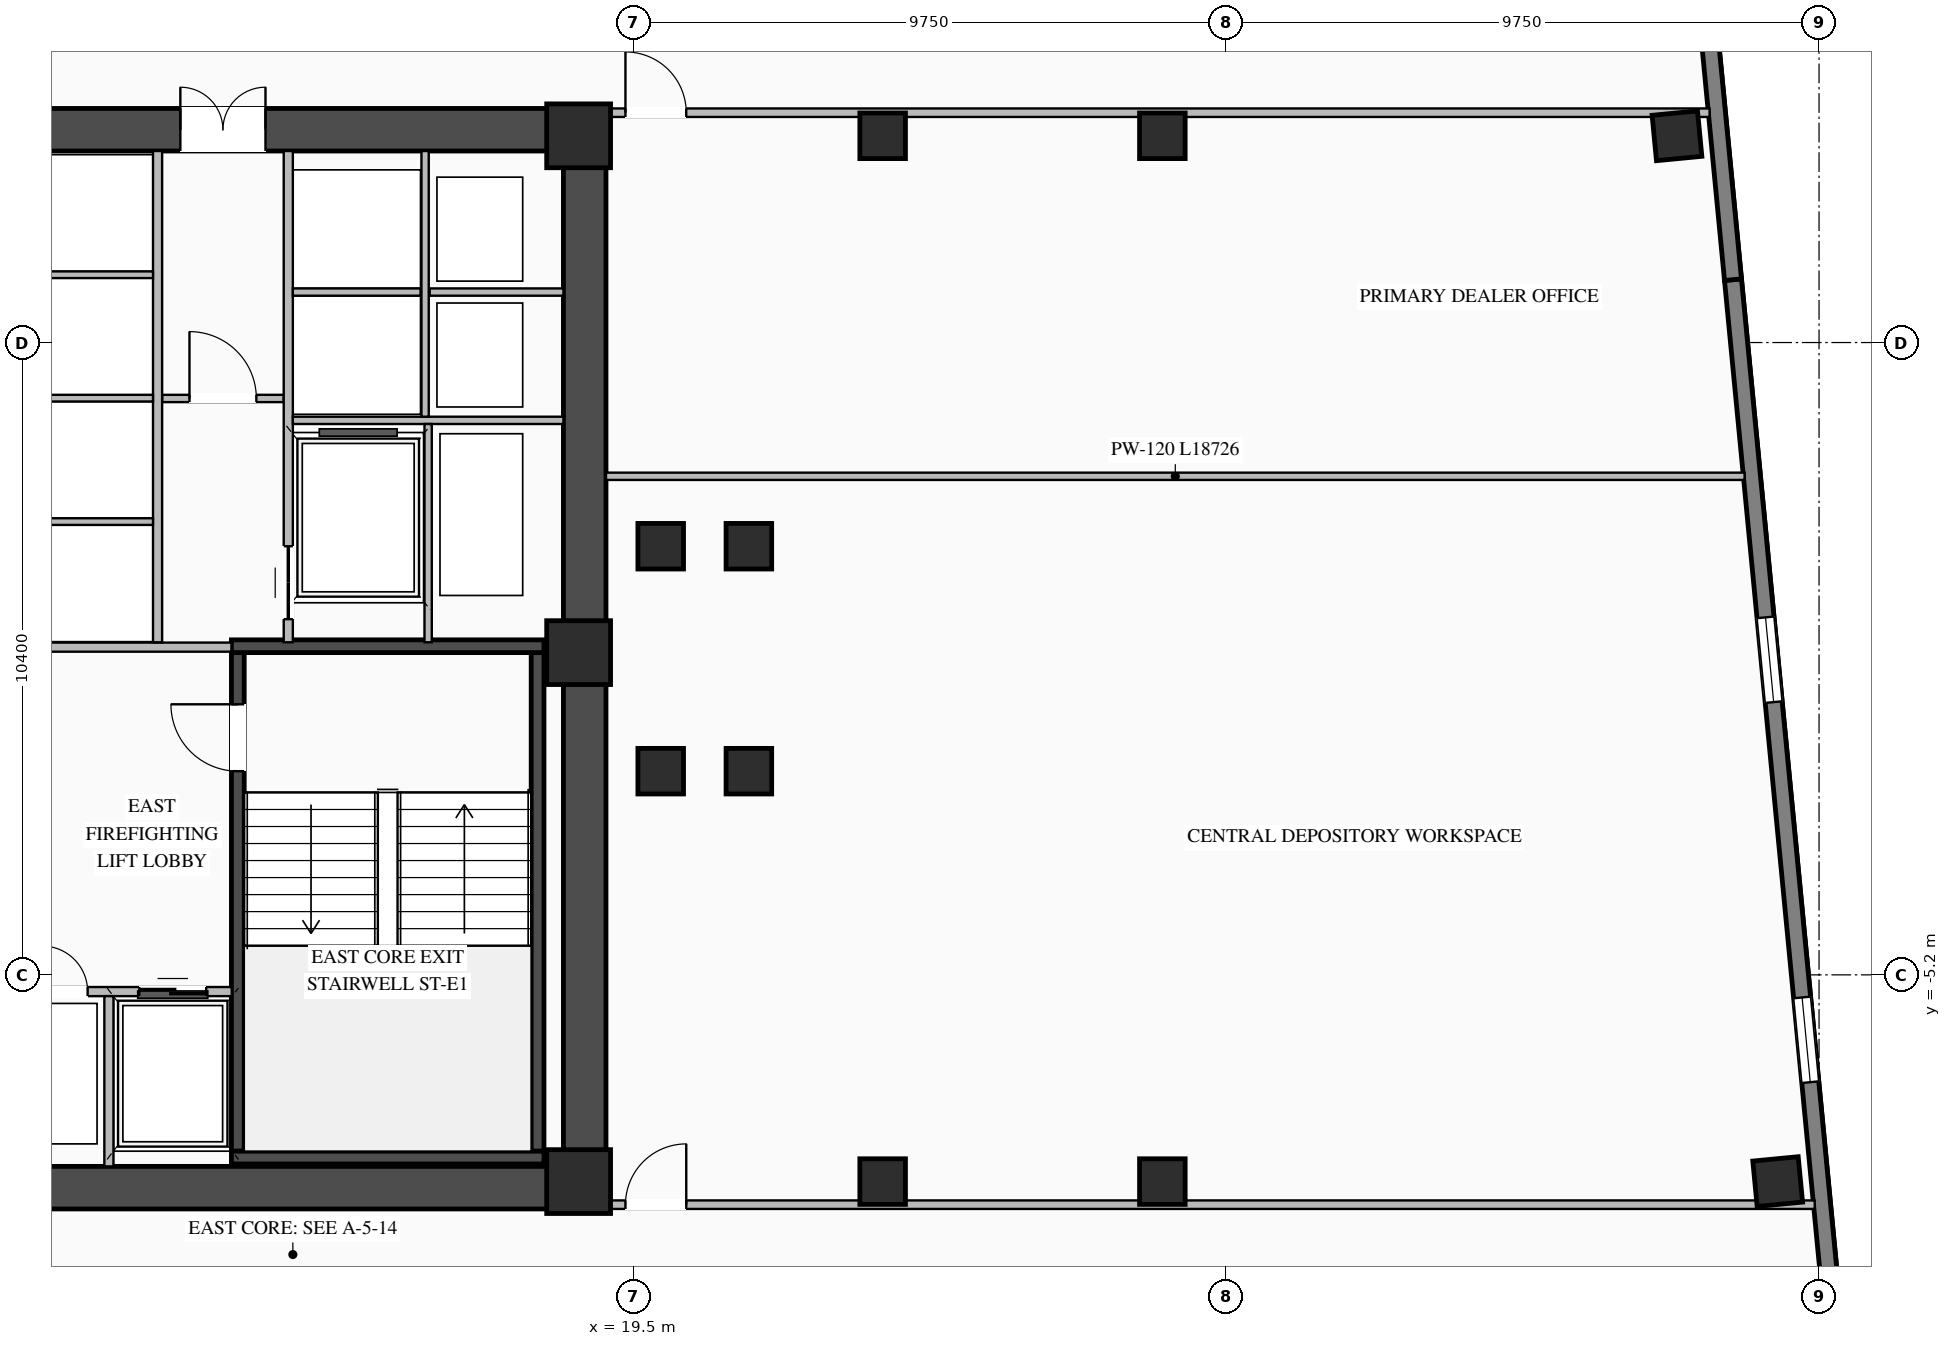
"""IFC4 building model, lengths in metres.
Left out: names, types, materials, properties, quantities, classifications, styles, units other than length and angle.
Written with IfcOpenShell. Run it as: python <this file> out.ifc"""

import sys

from ifc_helpers import new_model, si_unit, direction, frame, frame_2d, origin, origin_2d, place, context, subcontext, project, spatial, rectangle, i_section, extrude, element, fill, save


model = new_model("IFC4")
c1 = context("Model", 3, precision=1e-05, world=origin(), true_north=direction((0.0, 1.0)))
c2 = subcontext(c1, "Body", "Model", "MODEL_VIEW")
j1 = project(units=[si_unit("LENGTHUNIT", "METRE"), si_unit("PLANEANGLEUNIT", "RADIAN")], contexts=[c1])
p1 = place(None, origin())
s1 = spatial("IfcSite", under=j1, at=p1, CompositionType="ELEMENT")
p2 = place(p1, origin())
s2 = spatial("IfcBuilding", under=s1, at=p2, CompositionType="ELEMENT")
p3 = place(p2, frame((0.0, 0.0, 84.55)))
s3 = spatial("IfcBuildingStorey", under=s2, at=p3, CompositionType="ELEMENT", Elevation=84.55)
p4 = place(p3, frame((8.8, -8.7, 0.0), z_axis=(0.0, 0.0, 1.0), x_axis=(1.0, 0.0, 0.0)))
e1 = element("IfcWall", 1, at=p4, inside=s3, PredefinedType="SHEAR", context=c2, shape_type="SweptSolid", body=[
    extrude(rectangle(XDim=10.25, YDim=0.7, at=frame_2d((5.125, 0.0))), origin(), (0.0, 0.0, 1.0), 3.27),
])
p5 = place(p3, frame((8.8, 8.7, 0.0), z_axis=(0.0, 0.0, 1.0), x_axis=(1.0, 0.0, 0.0)))
e2 = element("IfcWall", 2, at=p5, inside=s3, PredefinedType="SHEAR", context=c2, shape_type="SweptSolid", body=[
    extrude(rectangle(XDim=10.25, YDim=0.7, at=frame_2d((5.125, 0.0))), origin(), (0.0, 0.0, 1.0), 3.27),
])
p6 = place(p5, frame((3.25, 0.0, 0.0)))
e3 = element("IfcOpeningElement", 3, at=p6, cuts=e2, PredefinedType="OPENING", context=c2, shape_type="SweptSolid", body=[
    extrude(rectangle(XDim=1.4, YDim=2.05, at=frame_2d((0.7, 1.025))), frame((0.0, 0.36, 0.0), z_axis=(0.0, -1.0, 0.0), x_axis=(1.0, 0.0, 0.0)), (0.0, 0.0, 1.0), 0.72),
])
p7 = place(p3, frame((18.7, -8.35, 0.0), z_axis=(0.0, 0.0, 1.0), x_axis=(0.0, 1.0, 0.0)))
e4 = element("IfcWall", 4, at=p7, inside=s3, PredefinedType="SHEAR", context=c2, shape_type="SweptSolid", body=[
    extrude(rectangle(XDim=16.7, YDim=0.7, at=frame_2d((8.35, 0.0))), origin(), (0.0, 0.0, 1.0), 3.27),
])
p8 = place(p3, frame((12.995, -8.1, 0.0), z_axis=(0.0, 0.0, 1.0), x_axis=(0.0, 1.0, 0.0)))
e5 = element("IfcWall", 5, at=p8, inside=s3, PredefinedType="SHEAR", context=c2, shape_type="SweptSolid", body=[
    extrude(rectangle(XDim=8.2, YDim=0.21, at=frame_2d((4.1, 0.0))), origin(), (0.0, 0.0, 1.0), 3.27),
])
p9 = place(p8, frame((6.25, 0.0, 0.0)))
e6 = element("IfcOpeningElement", 6, at=p9, cuts=e5, PredefinedType="OPENING", context=c2, shape_type="SweptSolid", body=[
    extrude(rectangle(XDim=1.1, YDim=2.15, at=frame_2d((0.55, 1.075))), frame((0.0, 0.115, 0.0), z_axis=(0.0, -1.0, 0.0), x_axis=(1.0, 0.0, 0.0)), (0.0, 0.0, 1.0), 0.23),
])
p10 = place(p3, frame((17.925, -8.1, 0.0), z_axis=(0.0, 0.0, 1.0), x_axis=(0.0, 1.0, 0.0)))
e7 = element("IfcWall", 7, at=p10, inside=s3, PredefinedType="SHEAR", context=c2, shape_type="SweptSolid", body=[
    extrude(rectangle(XDim=8.2, YDim=0.21, at=frame_2d((4.1, 0.0))), origin(), (0.0, 0.0, 1.0), 3.27),
])
for number, where, z_axis, x_axis in (
    (8, (12.89, -8.205, 0.0), (0.0, 0.0, 1.0), (1.0, 0.0, 0.0)),
    (9, (18.03, 0.205, 0.0), (0.0, 0.0, 1.0), (-1.0, 0.0, 0.0)),
):
    element("IfcWall", number, at=place(p3, frame(where, z_axis=z_axis, x_axis=x_axis)), inside=s3, PredefinedType="SHEAR", context=c2, shape_type="SweptSolid", body=[
        extrude(rectangle(XDim=5.14, YDim=0.21, at=frame_2d((2.57, 0.0))), origin(), (0.0, 0.0, 1.0), 3.27),
    ])
for number, where, z_axis, x_axis in (
    (10, (18.6, -8.6, 0.0), (0.0, 0.0, 1.0), (1.0, 0.0, 0.0)),
    (11, (18.6, 0.1, 0.0), (0.0, 0.0, 1.0), (1.0, 0.0, 0.0)),
    (12, (18.6, 8.6, 0.0), (0.0, 0.0, 1.0), (1.0, 0.0, 0.0)),
):
    element("IfcColumn", number, at=place(p3, frame(where, z_axis=z_axis, x_axis=x_axis)), inside=s3, PredefinedType="COLUMN", context=c2, shape_type="SweptSolid", body=[
        extrude(rectangle(XDim=1.05, YDim=1.05, at=origin_2d()), origin(), (0.0, 0.0, 1.0), 3.45),
    ])
for number, where, z_axis, x_axis in (
    (13, (19.95, -1.85, 0.0), (0.0, 0.0, 1.0), (1.0, 0.0, 0.0)),
    (14, (19.95, 1.85, 0.0), (0.0, 0.0, 1.0), (1.0, 0.0, 0.0)),
    (15, (21.4, -1.85, 0.0), (0.0, 0.0, 1.0), (1.0, 0.0, 0.0)),
    (16, (21.4, 1.85, 0.0), (0.0, 0.0, 1.0), (1.0, 0.0, 0.0)),
    (17, (23.6, -8.6, 0.0), (0.0, 0.0, 1.0), (1.0, 0.0, 0.0)),
    (18, (23.6, 8.6, 0.0), (0.0, 0.0, 1.0), (1.0, 0.0, 0.0)),
    (19, (28.2, -8.6, 0.0), (0.0, 0.0, 1.0), (1.0, 0.0, 0.0)),
    (20, (28.2, 8.6, 0.0), (0.0, 0.0, 1.0), (1.0, 0.0, 0.0)),
    (21, (38.32, -8.6, 0.0), (0.0, 0.0, 1.0), (0.995, 0.096, 0.0)),
    (22, (36.664, 8.6, 0.0), (0.0, 0.0, 1.0), (0.995, 0.096, 0.0)),
):
    element("IfcColumn", number, at=place(p3, frame(where, z_axis=z_axis, x_axis=x_axis)), inside=s3, PredefinedType="COLUMN", context=c2, shape_type="SweptSolid", body=[
        extrude(i_section(OverallWidth=0.75, OverallDepth=0.75, WebThickness=0.03, FlangeThickness=0.044, at=origin_2d()), origin(), (0.0, 0.0, 1.0), 3.45),
    ])
p11 = place(p3, frame((37.585, 6.234, 0.0), z_axis=(0.0, 0.0, 1.0), x_axis=(0.095841297881, -0.99539662729, 0.0)))
e23 = element("IfcWall", 23, at=p11, inside=s3, PredefinedType="STANDARD", context=c2, shape_type="SweptSolid", body=[
    extrude(rectangle(XDim=18.84, YDim=0.28, at=frame_2d((9.42, 0.0))), origin(), (0.0, 0.0, 1.0), 3.25),
])
p12 = place(p11, frame((5.58, 0.0, 0.76)))
e24 = element("IfcOpeningElement", 24, at=p12, cuts=e23, PredefinedType="OPENING", context=c2, shape_type="SweptSolid", body=[
    extrude(rectangle(XDim=1.4, YDim=1.95, at=frame_2d((0.7, 0.975))), frame((0.0, 0.15, 0.0), z_axis=(0.0, -1.0, 0.0), x_axis=(1.0, 0.0, 0.0)), (0.0, 0.0, 1.0), 0.3),
])
p13 = place(p11, frame((11.86, 0.0, 0.76)))
e25 = element("IfcOpeningElement", 25, at=p13, cuts=e23, PredefinedType="OPENING", context=c2, shape_type="SweptSolid", body=[
    extrude(rectangle(XDim=1.4, YDim=1.95, at=frame_2d((0.7, 0.975))), frame((0.0, 0.15, 0.0), z_axis=(0.0, -1.0, 0.0), x_axis=(1.0, 0.0, 0.0)), (0.0, 0.0, 1.0), 0.3),
])
p14 = place(p3, frame((35.779, 24.987, 0.0), z_axis=(0.0, 0.0, 1.0), x_axis=(0.095842534142, -0.995396508256, 0.0)))
e26 = element("IfcWall", 26, at=p14, inside=s3, PredefinedType="STANDARD", context=c2, shape_type="SweptSolid", body=[
    extrude(rectangle(XDim=18.84, YDim=0.28, at=frame_2d((9.42, 0.0))), origin(), (0.0, 0.0, 1.0), 3.25),
])
p15 = place(p14, frame((5.58, 0.0, 0.76)))
e27 = element("IfcOpeningElement", 27, at=p15, cuts=e26, PredefinedType="OPENING", context=c2, shape_type="SweptSolid", body=[
    extrude(rectangle(XDim=1.4, YDim=1.95, at=frame_2d((0.7, 0.975))), frame((0.0, 0.15, 0.0), z_axis=(0.0, -1.0, 0.0), x_axis=(1.0, 0.0, 0.0)), (0.0, 0.0, 1.0), 0.3),
])
p16 = place(p14, frame((11.86, 0.0, 0.76)))
e28 = element("IfcOpeningElement", 28, at=p16, cuts=e26, PredefinedType="OPENING", context=c2, shape_type="SweptSolid", body=[
    extrude(rectangle(XDim=1.4, YDim=1.95, at=frame_2d((0.7, 0.975))), frame((0.0, 0.15, 0.0), z_axis=(0.0, -1.0, 0.0), x_axis=(1.0, 0.0, 0.0)), (0.0, 0.0, 1.0), 0.3),
])
p17 = place(p3, frame((9.5, -5.475, 0.0), z_axis=(0.0, 0.0, 1.0), x_axis=(1.0, 0.0, 0.0)))
e29 = element("IfcWall", 29, at=p17, inside=s3, PredefinedType="STANDARD", context=c2, shape_type="SweptSolid", body=[
    extrude(rectangle(XDim=3.395, YDim=0.15, at=frame_2d((1.698, 0.0))), origin(), (0.0, 0.0, 1.0), 3.25),
])
p18 = place(p17, frame((1.875, 0.0, 0.0)))
e30 = element("IfcOpeningElement", 30, at=p18, cuts=e29, PredefinedType="OPENING", context=c2, shape_type="SweptSolid", body=[
    extrude(rectangle(XDim=1.1, YDim=2.15, at=frame_2d((0.55, 1.075))), frame((0.0, 0.085, 0.0), z_axis=(0.0, -1.0, 0.0), x_axis=(1.0, 0.0, 0.0)), (0.0, 0.0, 1.0), 0.17),
])
p19 = place(p17, frame((0.275, 0.0, 0.0)))
e31 = element("IfcOpeningElement", 31, at=p19, cuts=e29, PredefinedType="OPENING", context=c2, shape_type="SweptSolid", body=[
    extrude(rectangle(XDim=0.75, YDim=2.05, at=frame_2d((0.375, 1.025))), frame((0.0, 0.085, 0.0), z_axis=(0.0, -1.0, 0.0), x_axis=(1.0, 0.0, 0.0)), (0.0, 0.0, 1.0), 0.17),
])
p20 = place(p3, frame((10.875, -8.35, 0.0), z_axis=(0.0, 0.0, 1.0), x_axis=(0.0, 1.0, 0.0)))
e32 = element("IfcWall", 32, at=p20, inside=s3, PredefinedType="STANDARD", context=c2, shape_type="SweptSolid", body=[
    extrude(rectangle(XDim=2.8, YDim=0.15, at=frame_2d((1.4, 0.0))), origin(), (0.0, 0.0, 1.0), 3.25),
])
p21 = place(p3, frame((9.5, 0.19, 0.0), z_axis=(0.0, 0.0, 1.0), x_axis=(1.0, 0.0, 0.0)))
e33 = element("IfcWall", 33, at=p21, inside=s3, PredefinedType="STANDARD", context=c2, shape_type="SweptSolid", body=[
    extrude(rectangle(XDim=3.39, YDim=0.15, at=frame_2d((1.695, 0.0))), origin(), (0.0, 0.0, 1.0), 2.645),
])
p22 = place(p3, frame((11.75, 4.28, 0.0), z_axis=(0.0, 0.0, 1.0), x_axis=(1.0, 0.0, 0.0)))
e34 = element("IfcWall", 34, at=p22, inside=s3, PredefinedType="STANDARD", context=c2, shape_type="SweptSolid", body=[
    extrude(rectangle(XDim=2.0, YDim=0.12, at=frame_2d((1.0, 0.0))), origin(), (0.0, 0.0, 1.0), 3.25),
])
p23 = place(p22, frame((0.45, 0.0, 0.0)))
e35 = element("IfcOpeningElement", 35, at=p23, cuts=e34, PredefinedType="OPENING", context=c2, shape_type="SweptSolid", body=[
    extrude(rectangle(XDim=1.1, YDim=2.1, at=frame_2d((0.55, 1.05))), frame((0.0, 0.07, 0.0), z_axis=(0.0, -1.0, 0.0), x_axis=(1.0, 0.0, 0.0)), (0.0, 0.0, 1.0), 0.14),
])
p24 = place(p3, frame((11.675, 0.27, 0.0), z_axis=(0.0, 0.0, 1.0), x_axis=(0.0, 1.0, 0.0)))
e36 = element("IfcWall", 36, at=p24, inside=s3, PredefinedType="STANDARD", context=c2, shape_type="SweptSolid", body=[
    extrude(rectangle(XDim=8.08, YDim=0.15, at=frame_2d((4.04, 0.0))), origin(), (0.0, 0.0, 1.0), 3.25),
])
for number, where, z_axis, x_axis in (
    (37, (9.5, 2.255, 0.0), (0.0, 0.0, 1.0), (1.0, 0.0, 0.0)),
    (38, (9.5, 4.285, 0.0), (0.0, 0.0, 1.0), (1.0, 0.0, 0.0)),
    (39, (9.5, 6.315, 0.0), (0.0, 0.0, 1.0), (1.0, 0.0, 0.0)),
):
    element("IfcWall", number, at=place(p3, frame(where, z_axis=z_axis, x_axis=x_axis)), inside=s3, PredefinedType="STANDARD", context=c2, shape_type="SweptSolid", body=[
        extrude(rectangle(XDim=2.1, YDim=0.11, at=frame_2d((1.05, 0.0))), origin(), (0.0, 0.0, 1.0), 3.25),
    ])
p25 = place(p3, frame((13.825, 0.27, 0.0), z_axis=(0.0, 0.0, 1.0), x_axis=(0.0, 1.0, 0.0)))
e40 = element("IfcWall", 40, at=p25, inside=s3, PredefinedType="STANDARD", context=c2, shape_type="SweptSolid", body=[
    extrude(rectangle(XDim=8.08, YDim=0.15, at=frame_2d((4.04, 0.0))), origin(), (0.0, 0.0, 1.0), 3.25),
])
p26 = place(p25, frame((0.38, 0.0, 0.0)))
e41 = element("IfcOpeningElement", 41, at=p26, cuts=e40, PredefinedType="OPENING", context=c2, shape_type="SweptSolid", body=[
    extrude(rectangle(XDim=1.2, YDim=2.1, at=frame_2d((0.6, 1.05))), frame((0.0, 0.085, 0.0), z_axis=(0.0, -1.0, 0.0), x_axis=(1.0, 0.0, 0.0)), (0.0, 0.0, 1.0), 0.17),
])
p27 = place(p3, frame((13.9, 3.92, 0.0), z_axis=(0.0, 0.0, 1.0), x_axis=(1.0, 0.0, 0.0)))
e42 = element("IfcWall", 42, at=p27, inside=s3, PredefinedType="STANDARD", context=c2, shape_type="SweptSolid", body=[
    extrude(rectangle(XDim=4.45, YDim=0.12, at=frame_2d((2.225, 0.0))), origin(), (0.0, 0.0, 1.0), 3.25),
])
p28 = place(p3, frame((16.15, 6.03, 0.0), z_axis=(0.0, 0.0, 1.0), x_axis=(1.0, 0.0, 0.0)))
e43 = element("IfcWall", 43, at=p28, inside=s3, PredefinedType="STANDARD", context=c2, shape_type="SweptSolid", body=[
    extrude(rectangle(XDim=2.2, YDim=0.12, at=frame_2d((1.1, 0.0))), origin(), (0.0, 0.0, 1.0), 3.25),
])
p29 = place(p3, frame((16.075, 3.98, 0.0), z_axis=(0.0, 0.0, 1.0), x_axis=(0.0, 1.0, 0.0)))
e44 = element("IfcWall", 44, at=p29, inside=s3, PredefinedType="STANDARD", context=c2, shape_type="SweptSolid", body=[
    extrude(rectangle(XDim=4.37, YDim=0.12, at=frame_2d((2.185, 0.0))), origin(), (0.0, 0.0, 1.0), 3.25),
])
p30 = place(p3, frame((13.9, 6.03, 0.0), z_axis=(0.0, 0.0, 1.0), x_axis=(1.0, 0.0, 0.0)))
e45 = element("IfcWall", 45, at=p30, inside=s3, PredefinedType="STANDARD", context=c2, shape_type="SweptSolid", body=[
    extrude(rectangle(XDim=2.1, YDim=0.12, at=frame_2d((1.05, 0.0))), origin(), (0.0, 0.0, 1.0), 3.25),
])
p31 = place(p3, frame((16.125, 0.27, 0.0), z_axis=(0.0, 0.0, 1.0), x_axis=(0.0, 1.0, 0.0)))
e46 = element("IfcWall", 46, at=p31, inside=s3, PredefinedType="STANDARD", context=c2, shape_type="SweptSolid", body=[
    extrude(rectangle(XDim=3.59, YDim=0.12, at=frame_2d((1.795, 0.0))), origin(), (0.0, 0.0, 1.0), 3.25),
])
p32 = place(p3, frame((19.05, 8.98, 0.0), z_axis=(0.0, 0.0, 1.0), x_axis=(1.0, 0.0, 0.0)))
e47 = element("IfcWall", 47, at=p32, inside=s3, PredefinedType="STANDARD", context=c2, shape_type="SweptSolid", body=[
    extrude(rectangle(XDim=18.15, YDim=0.14, at=frame_2d((9.075, 0.0))), origin(), (0.0, 0.0, 1.0), 3.25),
])
p33 = place(p32, frame((0.32, 0.0, 0.0)))
e48 = element("IfcOpeningElement", 48, at=p33, cuts=e47, PredefinedType="OPENING", context=c2, shape_type="SweptSolid", body=[
    extrude(rectangle(XDim=1.0, YDim=2.08, at=frame_2d((0.5, 1.04))), frame((0.0, 0.08, 0.0), z_axis=(0.0, -1.0, 0.0), x_axis=(1.0, 0.0, 0.0)), (0.0, 0.0, 1.0), 0.16),
])
p34 = place(p3, frame((19.05, -8.98, 0.0), z_axis=(0.0, 0.0, 1.0), x_axis=(1.0, 0.0, 0.0)))
e49 = element("IfcWall", 49, at=p34, inside=s3, PredefinedType="STANDARD", context=c2, shape_type="SweptSolid", body=[
    extrude(rectangle(XDim=19.879, YDim=0.14, at=frame_2d((9.939, 0.0))), origin(), (0.0, 0.0, 1.0), 3.25),
])
p35 = place(p34, frame((0.32, 0.0, 0.0)))
e50 = element("IfcOpeningElement", 50, at=p35, cuts=e49, PredefinedType="OPENING", context=c2, shape_type="SweptSolid", body=[
    extrude(rectangle(XDim=1.0, YDim=2.08, at=frame_2d((0.5, 1.04))), frame((0.0, 0.08, 0.0), z_axis=(0.0, -1.0, 0.0), x_axis=(1.0, 0.0, 0.0)), (0.0, 0.0, 1.0), 0.16),
])
p36 = place(p3, frame((19.05, 3.0, 0.0), z_axis=(0.0, 0.0, 1.0), x_axis=(1.0, 0.0, 0.0)))
e51 = element("IfcWall", 51, at=p36, inside=s3, PredefinedType="STANDARD", context=c2, shape_type="SweptSolid", body=[
    extrude(rectangle(XDim=18.725, YDim=0.12, at=frame_2d((9.363, 0.0))), origin(), (0.0, 0.0, 1.0), 3.25),
])
p37 = place(p12, origin())
e52 = element("IfcWindow", 52, at=p37, inside=s3, PartitioningType="SINGLE_PANEL", PredefinedType="WINDOW", context=c2, shape_type="SweptSolid", body=[
    extrude(rectangle(XDim=1.4, YDim=1.95, at=frame_2d((0.7, 0.975))), frame((0.0, 0.03, 0.0), z_axis=(0.0, -1.0, 0.0), x_axis=(1.0, 0.0, 0.0)), (0.0, 0.0, 1.0), 0.06),
])
fill(e24, e52)
p38 = place(p13, origin())
e53 = element("IfcWindow", 53, at=p38, inside=s3, PartitioningType="SINGLE_PANEL", PredefinedType="WINDOW", context=c2, shape_type="SweptSolid", body=[
    extrude(rectangle(XDim=1.4, YDim=1.95, at=frame_2d((0.7, 0.975))), frame((0.0, 0.03, 0.0), z_axis=(0.0, -1.0, 0.0), x_axis=(1.0, 0.0, 0.0)), (0.0, 0.0, 1.0), 0.06),
])
fill(e25, e53)
p39 = place(p9, origin())
e54 = element("IfcDoor", 54, at=p39, inside=s3, OperationType="SINGLE_SWING_RIGHT", PredefinedType="DOOR", context=c2, shape_type="SweptSolid", body=[
    extrude(rectangle(XDim=1.1, YDim=2.15, at=frame_2d((0.55, 1.075))), frame((0.0, 0.025, 0.0), z_axis=(0.0, -1.0, 0.0), x_axis=(1.0, 0.0, 0.0)), (0.0, 0.0, 1.0), 0.05),
])
fill(e6, e54)
p40 = place(p18, origin())
e55 = element("IfcDoor", 55, at=p40, inside=s3, OperationType="DOUBLE_DOOR_SLIDING", PredefinedType="DOOR", context=c2, shape_type="SweptSolid", body=[
    extrude(rectangle(XDim=1.1, YDim=2.15, at=frame_2d((0.55, 1.075))), frame((0.0, 0.025, 0.0), z_axis=(0.0, -1.0, 0.0), x_axis=(1.0, 0.0, 0.0)), (0.0, 0.0, 1.0), 0.05),
])
fill(e30, e55)
p41 = place(p19, origin())
e56 = element("IfcDoor", 56, at=p41, inside=s3, OperationType="SINGLE_SWING_LEFT", PredefinedType="DOOR", context=c2, shape_type="SweptSolid", body=[
    extrude(rectangle(XDim=0.75, YDim=2.05, at=frame_2d((0.375, 1.025))), frame((0.0, 0.025, 0.0), z_axis=(0.0, -1.0, 0.0), x_axis=(1.0, 0.0, 0.0)), (0.0, 0.0, 1.0), 0.05),
])
fill(e31, e56)
p42 = place(p23, origin())
e57 = element("IfcDoor", 57, at=p42, inside=s3, OperationType="SINGLE_SWING_LEFT", PredefinedType="DOOR", context=c2, shape_type="SweptSolid", body=[
    extrude(rectangle(XDim=1.1, YDim=2.1, at=frame_2d((0.55, 1.05))), frame((0.0, 0.025, 0.0), z_axis=(0.0, -1.0, 0.0), x_axis=(1.0, 0.0, 0.0)), (0.0, 0.0, 1.0), 0.05),
])
fill(e35, e57)
p43 = place(p6, origin())
e58 = element("IfcDoor", 58, at=p43, inside=s3, OperationType="DOUBLE_DOOR_SINGLE_SWING", PredefinedType="DOOR", context=c2, shape_type="SweptSolid", body=[
    extrude(rectangle(XDim=1.4, YDim=2.05, at=frame_2d((0.7, 1.025))), frame((0.0, 0.295, 0.0), z_axis=(0.0, -1.0, 0.0), x_axis=(1.0, 0.0, 0.0)), (0.0, 0.0, 1.0), 0.05),
])
fill(e3, e58)
p44 = place(p26, origin())
e59 = element("IfcDoor", 59, at=p44, inside=s3, OperationType="DOUBLE_DOOR_SLIDING", PredefinedType="DOOR", context=c2, shape_type="SweptSolid", body=[
    extrude(rectangle(XDim=1.2, YDim=2.1, at=frame_2d((0.6, 1.05))), frame((0.0, 0.025, 0.0), z_axis=(0.0, -1.0, 0.0), x_axis=(1.0, 0.0, 0.0)), (0.0, 0.0, 1.0), 0.05),
])
fill(e41, e59)
p45 = place(p33, origin())
e60 = element("IfcDoor", 60, at=p45, inside=s3, OperationType="SINGLE_SWING_LEFT", PredefinedType="DOOR", context=c2, shape_type="SweptSolid", body=[
    extrude(rectangle(XDim=1.0, YDim=2.08, at=frame_2d((0.5, 1.04))), frame((0.0, 0.025, 0.0), z_axis=(0.0, -1.0, 0.0), x_axis=(1.0, 0.0, 0.0)), (0.0, 0.0, 1.0), 0.05),
])
fill(e48, e60)
p46 = place(p35, origin())
e61 = element("IfcDoor", 61, at=p46, inside=s3, OperationType="SINGLE_SWING_RIGHT", PredefinedType="DOOR", context=c2, shape_type="SweptSolid", body=[
    extrude(rectangle(XDim=1.0, YDim=2.08, at=frame_2d((0.5, 1.04))), frame((0.0, 0.025, 0.0), z_axis=(0.0, -1.0, 0.0), x_axis=(1.0, 0.0, 0.0)), (0.0, 0.0, 1.0), 0.05),
])
fill(e50, e61)
save(model, sys.argv[1])
